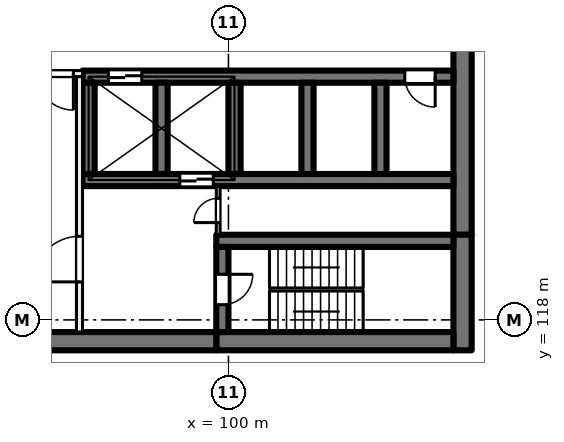
"""IFC4 building model, lengths in metres.
Left out: names, types, materials, properties, quantities, classifications, styles, units other than length and angle.
Written with IfcOpenShell. Run it as: python <this file> out.ifc"""

import sys

from ifc_helpers import new_model, si_unit, direction, frame, frame_2d, origin, place, context, subcontext, project, spatial, rectangle, extrude, element, fill, save


model = new_model("IFC4")
c1 = context("Model", 3, precision=1e-05, world=origin(), true_north=direction((0.0, 1.0)))
c2 = subcontext(c1, "Body", "Model", "MODEL_VIEW")
j1 = project(units=[si_unit("LENGTHUNIT", "METRE"), si_unit("PLANEANGLEUNIT", "RADIAN")], contexts=[c1])
p1 = place(None, origin())
s1 = spatial("IfcSite", under=j1, at=p1, CompositionType="ELEMENT")
p2 = place(p1, origin())
s2 = spatial("IfcBuilding", under=s1, at=p2, CompositionType="ELEMENT")
p3 = place(p2, frame((0.0, 0.0, 47.5)))
s3 = spatial("IfcBuildingStorey", under=s2, at=p3, CompositionType="ELEMENT", Elevation=47.5)
p4 = place(p3, frame((107.7, 135.2, 0.0), z_axis=(0.0, 0.0, 1.0), x_axis=(0.0, -1.0, 0.0)))
e1 = element("IfcWall", 1, at=p4, inside=s3, PredefinedType="SHEAR", context=c2, shape_type="SweptSolid", body=[
    extrude(rectangle(XDim=14.4, YDim=0.6, at=frame_2d((7.2, 0.0))), origin(), (0.0, 0.0, 1.0), 4.0),
])
p5 = place(p3, frame((107.7, 120.8, 0.0), z_axis=(0.0, 0.0, 1.0), x_axis=(0.0, -1.0, 0.0)))
e2 = element("IfcWall", 2, at=p5, inside=s3, PredefinedType="SHEAR", context=c2, shape_type="SweptSolid", body=[
    extrude(rectangle(XDim=3.8, YDim=0.6, at=frame_2d((1.9, 0.0))), origin(), (0.0, 0.0, 1.0), 4.0),
])
p6 = place(p3, frame((107.4, 117.3, 0.0), z_axis=(0.0, 0.0, 1.0), x_axis=(-1.0, 0.0, 0.0)))
e3 = element("IfcWall", 3, at=p6, inside=s3, PredefinedType="SHEAR", context=c2, shape_type="SweptSolid", body=[
    extrude(rectangle(XDim=7.8, YDim=0.6, at=frame_2d((3.9, 0.0))), origin(), (0.0, 0.0, 1.0), 4.0),
])
p7 = place(p3, frame((99.6, 117.3, 0.0), z_axis=(0.0, 0.0, 1.0), x_axis=(-1.0, 0.0, 0.0)))
e4 = element("IfcWall", 4, at=p7, inside=s3, PredefinedType="SHEAR", context=c2, shape_type="SweptSolid", body=[
    extrude(rectangle(XDim=8.9, YDim=0.6, at=frame_2d((4.45, 0.0))), origin(), (0.0, 0.0, 1.0), 4.0),
])
p8 = place(p3, frame((107.4, 120.6, 0.0), z_axis=(0.0, 0.0, 1.0), x_axis=(-1.0, 0.0, 0.0)))
e5 = element("IfcWall", 5, at=p8, inside=s3, PredefinedType="SHEAR", context=c2, shape_type="SweptSolid", body=[
    extrude(rectangle(XDim=7.8, YDim=0.4, at=frame_2d((3.9, 0.0))), origin(), (0.0, 0.0, 1.0), 4.0),
])
p9 = place(p3, frame((99.8, 120.4, 0.0), z_axis=(0.0, 0.0, 1.0), x_axis=(0.0, -1.0, 0.0)))
e6 = element("IfcWall", 6, at=p9, inside=s3, PredefinedType="SHEAR", context=c2, shape_type="SweptSolid", body=[
    extrude(rectangle(XDim=2.8, YDim=0.4, at=frame_2d((1.4, 0.0))), origin(), (0.0, 0.0, 1.0), 4.0),
])
p10 = place(p9, frame((0.9, 0.0, 0.0)))
e7 = element("IfcOpeningElement", 7, at=p10, cuts=e6, PredefinedType="OPENING", context=c2, shape_type="SweptSolid", body=[
    extrude(rectangle(XDim=1.0, YDim=2.1, at=frame_2d((0.5, 1.05))), frame((0.0, 0.21, 0.0), z_axis=(0.0, -1.0, 0.0), x_axis=(1.0, 0.0, 0.0)), (0.0, 0.0, 1.0), 0.42),
])
p11 = place(p3, frame((107.4, 126.0, 0.0), z_axis=(0.0, 0.0, 1.0), x_axis=(-1.0, 0.0, 0.0)))
e8 = element("IfcWall", 8, at=p11, inside=s3, PredefinedType="SHEAR", context=c2, shape_type="SweptSolid", body=[
    extrude(rectangle(XDim=12.2, YDim=0.4, at=frame_2d((6.1, 0.0))), origin(), (0.0, 0.0, 1.0), 4.0),
])
p12 = place(p11, frame((10.25, 0.0, 0.0)))
e9 = element("IfcOpeningElement", 9, at=p12, cuts=e8, PredefinedType="OPENING", context=c2, shape_type="SweptSolid", body=[
    extrude(rectangle(XDim=1.1, YDim=2.1, at=frame_2d((0.55, 1.05))), frame((0.0, 0.21, 0.0), z_axis=(0.0, -1.0, 0.0), x_axis=(1.0, 0.0, 0.0)), (0.0, 0.0, 1.0), 0.42),
])
p13 = place(p11, frame((0.6, 0.0, 0.0)))
e10 = element("IfcOpeningElement", 10, at=p13, cuts=e8, PredefinedType="OPENING", context=c2, shape_type="SweptSolid", body=[
    extrude(rectangle(XDim=1.0, YDim=2.1, at=frame_2d((0.5, 1.05))), frame((0.0, 0.21, 0.0), z_axis=(0.0, -1.0, 0.0), x_axis=(1.0, 0.0, 0.0)), (0.0, 0.0, 1.0), 0.42),
])
p14 = place(p3, frame((107.4, 122.6, 0.0), z_axis=(0.0, 0.0, 1.0), x_axis=(-1.0, 0.0, 0.0)))
e11 = element("IfcWall", 11, at=p14, inside=s3, PredefinedType="SHEAR", context=c2, shape_type="SweptSolid", body=[
    extrude(rectangle(XDim=12.2, YDim=0.4, at=frame_2d((6.1, 0.0))), origin(), (0.0, 0.0, 1.0), 4.0),
])
p15 = place(p14, frame((7.9, 0.0, 0.0)))
e12 = element("IfcOpeningElement", 12, at=p15, cuts=e11, PredefinedType="OPENING", context=c2, shape_type="SweptSolid", body=[
    extrude(rectangle(XDim=1.1, YDim=2.1, at=frame_2d((0.55, 1.05))), frame((0.0, 0.21, 0.0), z_axis=(0.0, -1.0, 0.0), x_axis=(1.0, 0.0, 0.0)), (0.0, 0.0, 1.0), 0.42),
])
for number, where, z_axis, x_axis in (
    (13, (105.0, 125.8, 0.0), (0.0, 0.0, 1.0), (0.0, -1.0, 0.0)),
    (14, (102.6, 125.8, 0.0), (0.0, 0.0, 1.0), (0.0, -1.0, 0.0)),
    (15, (100.2, 125.8, 0.0), (0.0, 0.0, 1.0), (0.0, -1.0, 0.0)),
    (16, (97.8, 125.8, 0.0), (0.0, 0.0, 1.0), (0.0, -1.0, 0.0)),
    (17, (95.4, 125.8, 0.0), (0.0, 0.0, 1.0), (0.0, -1.0, 0.0)),
):
    element("IfcWall", number, at=place(p3, frame(where, z_axis=z_axis, x_axis=x_axis)), inside=s3, PredefinedType="SHEAR", context=c2, shape_type="SweptSolid", body=[
        extrude(rectangle(XDim=3.0, YDim=0.4, at=frame_2d((1.5, 0.0))), origin(), (0.0, 0.0, 1.0), 4.0),
    ])
p16 = place(p3, frame((95.2, 126.1, 0.0), z_axis=(0.0, 0.0, 1.0), x_axis=(-1.0, 0.0, 0.0)))
e18 = element("IfcWall", 18, at=p16, inside=s3, PredefinedType="PARTITIONING", context=c2, shape_type="SweptSolid", body=[
    extrude(rectangle(XDim=3.8, YDim=0.2, at=frame_2d((1.9, 0.0))), origin(), (0.0, 0.0, 1.0), 3.625),
])
p17 = place(p16, frame((0.3, 0.0, 0.0)))
e19 = element("IfcOpeningElement", 19, at=p17, cuts=e18, PredefinedType="OPENING", context=c2, shape_type="SweptSolid", body=[
    extrude(rectangle(XDim=1.2, YDim=2.1, at=frame_2d((0.6, 1.05))), frame((0.0, 0.11, 0.0), z_axis=(0.0, -1.0, 0.0), x_axis=(1.0, 0.0, 0.0)), (0.0, 0.0, 1.0), 0.22),
])
p18 = place(p3, frame((95.1, 117.6, 0.0), z_axis=(0.0, 0.0, 1.0), x_axis=(0.0, 1.0, 0.0)))
e20 = element("IfcWall", 20, at=p18, inside=s3, PredefinedType="PARTITIONING", context=c2, shape_type="SweptSolid", body=[
    extrude(rectangle(XDim=8.4, YDim=0.2, at=frame_2d((4.2, 0.0))), origin(), (0.0, 0.0, 1.0), 3.625),
])
p19 = place(p18, frame((1.65, 0.0, 0.0)))
e21 = element("IfcOpeningElement", 21, at=p19, cuts=e20, PredefinedType="OPENING", context=c2, shape_type="SweptSolid", body=[
    extrude(rectangle(XDim=1.5, YDim=2.1, at=frame_2d((0.75, 1.05))), frame((0.0, 0.11, 0.0), z_axis=(0.0, -1.0, 0.0), x_axis=(1.0, 0.0, 0.0)), (0.0, 0.0, 1.0), 0.22),
])
p20 = place(p3, frame((99.663, 120.8, 0.0), z_axis=(0.0, 0.0, 1.0), x_axis=(0.0, 1.0, 0.0)))
e22 = element("IfcWall", 22, at=p20, inside=s3, PredefinedType="PARTITIONING", context=c2, shape_type="SweptSolid", body=[
    extrude(rectangle(XDim=1.6, YDim=0.125, at=frame_2d((0.8, 0.0))), origin(), (0.0, 0.0, 1.0), 3.625),
])
p21 = place(p20, frame((0.4, 0.0, 0.0)))
e23 = element("IfcOpeningElement", 23, at=p21, cuts=e22, PredefinedType="OPENING", context=c2, shape_type="SweptSolid", body=[
    extrude(rectangle(XDim=0.8, YDim=2.1, at=frame_2d((0.4, 1.05))), frame((0.0, 0.073, 0.0), z_axis=(0.0, -1.0, 0.0), x_axis=(1.0, 0.0, 0.0)), (0.0, 0.0, 1.0), 0.145),
])
p22 = place(p12, origin())
e24 = element("IfcDoor", 24, at=p22, inside=s3, OperationType="DOUBLE_DOOR_SLIDING", PredefinedType="DOOR", context=c2, shape_type="SweptSolid", body=[
    extrude(rectangle(XDim=1.1, YDim=2.1, at=frame_2d((0.55, 1.05))), frame((0.0, 0.025, 0.0), z_axis=(0.0, -1.0, 0.0), x_axis=(1.0, 0.0, 0.0)), (0.0, 0.0, 1.0), 0.05),
])
fill(e9, e24)
p23 = place(p13, origin())
e25 = element("IfcDoor", 25, at=p23, inside=s3, OperationType="SINGLE_SWING_LEFT", PredefinedType="DOOR", context=c2, shape_type="SweptSolid", body=[
    extrude(rectangle(XDim=1.0, YDim=2.1, at=frame_2d((0.5, 1.05))), frame((0.0, 0.025, 0.0), z_axis=(0.0, -1.0, 0.0), x_axis=(1.0, 0.0, 0.0)), (0.0, 0.0, 1.0), 0.05),
])
fill(e10, e25)
p24 = place(p17, origin())
e26 = element("IfcDoor", 26, at=p24, inside=s3, OperationType="DOUBLE_DOOR_SINGLE_SWING", PredefinedType="DOOR", context=c2, shape_type="SweptSolid", body=[
    extrude(rectangle(XDim=1.2, YDim=2.1, at=frame_2d((0.6, 1.05))), frame((0.0, 0.025, 0.0), z_axis=(0.0, -1.0, 0.0), x_axis=(1.0, 0.0, 0.0)), (0.0, 0.0, 1.0), 0.05),
])
fill(e19, e26)
p25 = place(p19, origin())
e27 = element("IfcDoor", 27, at=p25, inside=s3, OperationType="DOUBLE_DOOR_SINGLE_SWING", PredefinedType="DOOR", context=c2, shape_type="SweptSolid", body=[
    extrude(rectangle(XDim=1.5, YDim=2.1, at=frame_2d((0.75, 1.05))), frame((0.0, 0.025, 0.0), z_axis=(0.0, -1.0, 0.0), x_axis=(1.0, 0.0, 0.0)), (0.0, 0.0, 1.0), 0.05),
])
fill(e21, e27)
p26 = place(p10, origin())
e28 = element("IfcDoor", 28, at=p26, inside=s3, OperationType="SINGLE_SWING_LEFT", PredefinedType="DOOR", context=c2, shape_type="SweptSolid", body=[
    extrude(rectangle(XDim=1.0, YDim=2.1, at=frame_2d((0.5, 1.05))), frame((0.0, 0.025, 0.0), z_axis=(0.0, -1.0, 0.0), x_axis=(1.0, 0.0, 0.0)), (0.0, 0.0, 1.0), 0.05),
])
fill(e7, e28)
p27 = place(p21, origin())
e29 = element("IfcDoor", 29, at=p27, inside=s3, OperationType="SINGLE_SWING_RIGHT", PredefinedType="DOOR", context=c2, shape_type="SweptSolid", body=[
    extrude(rectangle(XDim=0.8, YDim=2.1, at=frame_2d((0.4, 1.05))), frame((0.0, 0.025, 0.0), z_axis=(0.0, -1.0, 0.0), x_axis=(1.0, 0.0, 0.0)), (0.0, 0.0, 1.0), 0.05),
])
fill(e23, e29)
p28 = place(p15, origin())
e30 = element("IfcDoor", 30, at=p28, inside=s3, OperationType="DOUBLE_DOOR_SLIDING", PredefinedType="DOOR", context=c2, shape_type="SweptSolid", body=[
    extrude(rectangle(XDim=1.1, YDim=2.1, at=frame_2d((0.55, 1.05))), frame((0.0, 0.025, 0.0), z_axis=(0.0, -1.0, 0.0), x_axis=(1.0, 0.0, 0.0)), (0.0, 0.0, 1.0), 0.05),
])
fill(e12, e30)
save(model, sys.argv[1])
